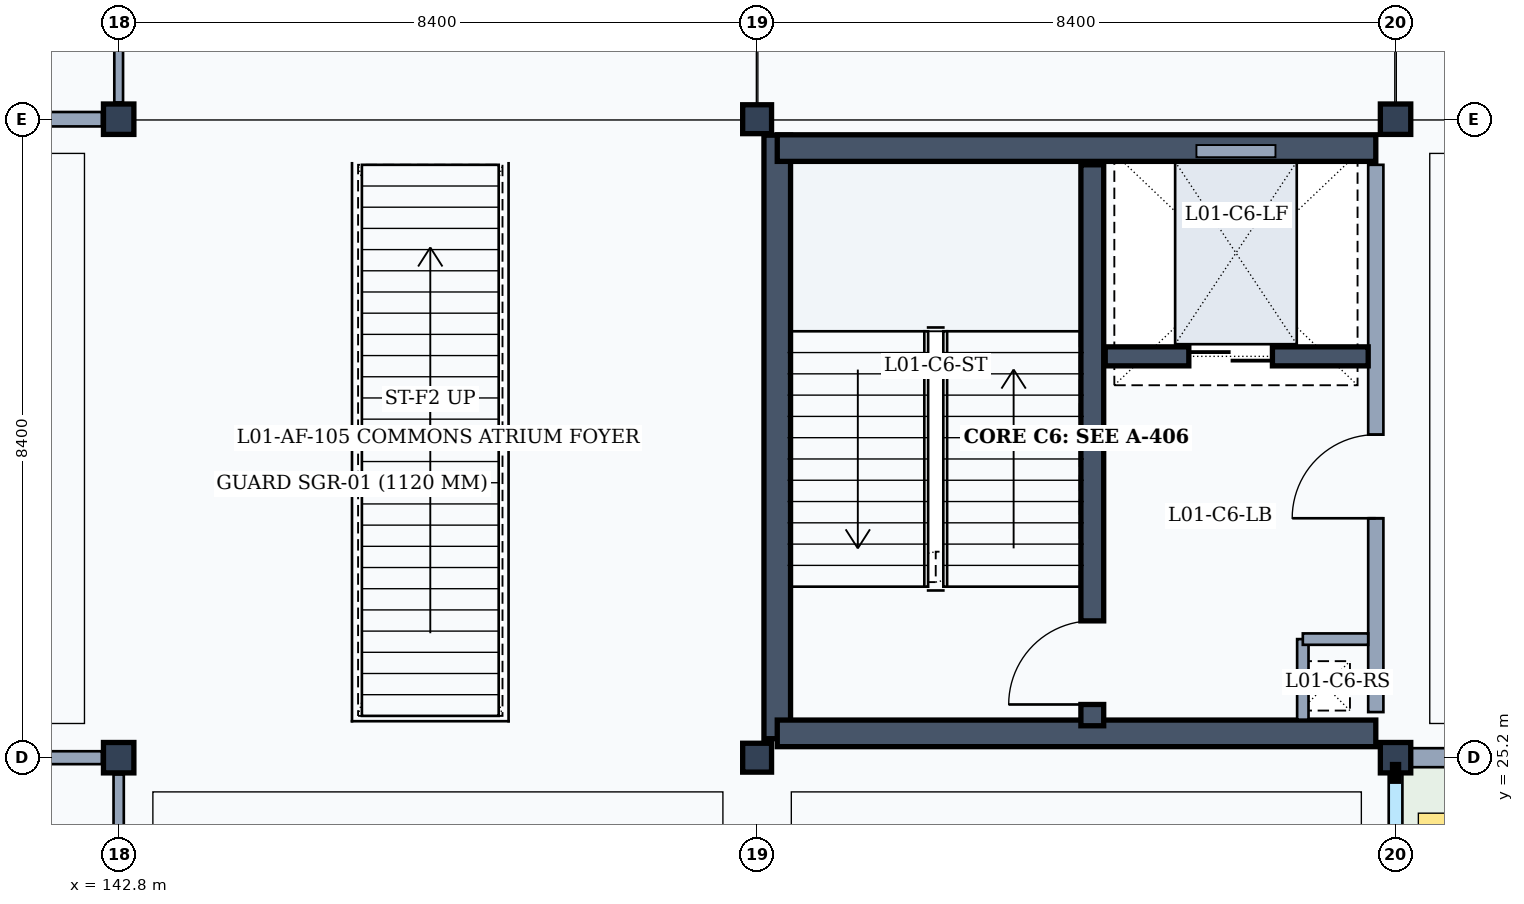
"""IFC4 building model, lengths in metres.
Left out: names, types, materials, properties, quantities, classifications, styles, units other than length and angle.
Written with IfcOpenShell. Run it as: python <this file> out.ifc"""

import sys

from ifc_helpers import new_model, si_unit, direction, frame, frame_2d, origin, origin_2d, place, context, subcontext, project, spatial, rectangle, extrude, element, fill, save


model = new_model("IFC4")
c1 = context("Model", 3, precision=1e-05, world=origin(), true_north=direction((0.0, 1.0)))
c2 = subcontext(c1, "Body", "Model", "MODEL_VIEW")
j1 = project(units=[si_unit("LENGTHUNIT", "METRE"), si_unit("PLANEANGLEUNIT", "RADIAN")], contexts=[c1])
p1 = place(None, origin())
s1 = spatial("IfcSite", under=j1, at=p1, CompositionType="ELEMENT")
p2 = place(p1, origin())
s2 = spatial("IfcBuilding", under=s1, at=p2, CompositionType="ELEMENT")
p3 = place(p2, frame((0.0, 0.0, 4.8)))
s3 = spatial("IfcBuildingStorey", under=s2, at=p3, CompositionType="ELEMENT", Elevation=4.8)
for number, where, z_axis, x_axis in (
    (1, (142.8, 25.2, 0.0), (0.0, 0.0, 1.0), (1.0, 0.0, 0.0)),
    (2, (142.8, 33.6, 0.0), (0.0, 0.0, 1.0), (1.0, 0.0, 0.0)),
):
    element("IfcColumn", number, at=place(p3, frame(where, z_axis=z_axis, x_axis=x_axis)), inside=s3, PredefinedType="COLUMN", context=c2, shape_type="SweptSolid", body=[
        extrude(rectangle(XDim=0.4, YDim=0.4, at=origin_2d()), origin(), (0.0, 0.0, 1.0), 4.8),
    ])
for number, where, z_axis, x_axis in (
    (3, (151.2, 25.2, 0.0), (0.0, 0.0, 1.0), (1.0, 0.0, 0.0)),
    (4, (151.2, 33.6, 0.0), (0.0, 0.0, 1.0), (1.0, 0.0, 0.0)),
):
    element("IfcColumn", number, at=place(p3, frame(where, z_axis=z_axis, x_axis=x_axis)), inside=s3, PredefinedType="COLUMN", context=c2, shape_type="SweptSolid", body=[
        extrude(rectangle(XDim=0.38, YDim=0.38, at=origin_2d()), origin(), (0.0, 0.0, 1.0), 4.8),
    ])
for number, where, z_axis, x_axis in (
    (5, (159.6, 25.2, 0.0), (0.0, 0.0, 1.0), (1.0, 0.0, 0.0)),
    (6, (159.6, 33.6, 0.0), (0.0, 0.0, 1.0), (1.0, 0.0, 0.0)),
):
    element("IfcColumn", number, at=place(p3, frame(where, z_axis=z_axis, x_axis=x_axis)), inside=s3, PredefinedType="COLUMN", context=c2, shape_type="SweptSolid", body=[
        extrude(rectangle(XDim=0.4, YDim=0.4, at=origin_2d()), origin(), (0.0, 0.0, 1.0), 4.8),
    ])
p4 = place(p3, frame((167.81, 25.2, 0.0), z_axis=(0.0, 0.0, 1.0), x_axis=(-1.0, 0.0, 0.0)))
e7 = element("IfcWall", 7, at=p4, inside=s3, PredefinedType="SOLIDWALL", context=c2, shape_type="SweptSolid", body=[
    extrude(rectangle(XDim=8.01, YDim=0.25, at=frame_2d((4.005, 0.0))), origin(), (0.0, 0.0, 1.0), 3.95),
])
p5 = place(p4, frame((3.005, 0.0, 0.9)))
e8 = element("IfcOpeningElement", 8, at=p5, cuts=e7, PredefinedType="OPENING", context=c2, shape_type="SweptSolid", body=[
    extrude(rectangle(XDim=2.0, YDim=1.7, at=frame_2d((1.0, 0.85))), frame((0.0, 0.135, 0.0), z_axis=(0.0, -1.0, 0.0), x_axis=(1.0, 0.0, 0.0)), (0.0, 0.0, 1.0), 0.27),
])
p6 = place(p3, frame((151.465, 25.45, 0.0), z_axis=(0.0, 0.0, 1.0), x_axis=(0.0, 1.0, 0.0)))
e9 = element("IfcWall", 9, at=p6, inside=s3, PredefinedType="SHEAR", context=c2, shape_type="SweptSolid", body=[
    extrude(rectangle(XDim=7.94, YDim=0.35, at=frame_2d((3.97, 0.0))), origin(), (0.0, 0.0, 1.0), 4.55),
])
p7 = place(p3, frame((151.465, 33.22, 0.0), z_axis=(0.0, 0.0, 1.0), x_axis=(1.0, 0.0, 0.0)))
e10 = element("IfcWall", 10, at=p7, inside=s3, PredefinedType="SHEAR", context=c2, shape_type="SweptSolid", body=[
    extrude(rectangle(XDim=7.875, YDim=0.35, at=frame_2d((3.938, 0.0))), origin(), (0.0, 0.0, 1.0), 4.55),
])
p8 = place(p3, frame((159.34, 33.0, 0.0), z_axis=(0.0, 0.0, 1.0), x_axis=(0.0, -1.0, 0.0)))
e11 = element("IfcWall", 11, at=p8, inside=s3, PredefinedType="PARTITIONING", context=c2, shape_type="SweptSolid", body=[
    extrude(rectangle(XDim=7.2, YDim=0.2, at=frame_2d((3.6, 0.0))), origin(), (0.0, 0.0, 1.0), 3.92),
])
p9 = place(p8, frame((3.55, 0.0, 0.0)))
e12 = element("IfcOpeningElement", 12, at=p9, cuts=e11, PredefinedType="OPENING", context=c2, shape_type="SweptSolid", body=[
    extrude(rectangle(XDim=1.1, YDim=2.15, at=frame_2d((0.55, 1.075))), frame((0.0, 0.11, 0.0), z_axis=(0.0, -1.0, 0.0), x_axis=(1.0, 0.0, 0.0)), (0.0, 0.0, 1.0), 0.22),
])
p10 = place(p3, frame((159.34, 25.52, 0.0), z_axis=(0.0, 0.0, 1.0), x_axis=(-1.0, 0.0, 0.0)))
e13 = element("IfcWall", 13, at=p10, inside=s3, PredefinedType="SHEAR", context=c2, shape_type="SweptSolid", body=[
    extrude(rectangle(XDim=7.875, YDim=0.35, at=frame_2d((3.938, 0.0))), origin(), (0.0, 0.0, 1.0), 4.55),
])
p11 = place(p3, frame((155.61, 25.62, 0.0), z_axis=(0.0, 0.0, 1.0), x_axis=(0.0, 1.0, 0.0)))
e14 = element("IfcWall", 14, at=p11, inside=s3, PredefinedType="SHEAR", context=c2, shape_type="SweptSolid", body=[
    extrude(rectangle(XDim=7.38, YDim=0.3, at=frame_2d((3.69, 0.0))), origin(), (0.0, 0.0, 1.0), 4.55),
])
p12 = place(p11, frame((0.28, 0.0, 0.0)))
e15 = element("IfcOpeningElement", 15, at=p12, cuts=e14, PredefinedType="OPENING", context=c2, shape_type="SweptSolid", body=[
    extrude(rectangle(XDim=1.1, YDim=2.15, at=frame_2d((0.55, 1.075))), frame((0.0, 0.16, 0.0), z_axis=(0.0, -1.0, 0.0), x_axis=(1.0, 0.0, 0.0)), (0.0, 0.0, 1.0), 0.32),
])
p13 = place(p3, frame((158.38, 26.76, 0.0), z_axis=(0.0, 0.0, 1.0), x_axis=(0.0, -1.0, 0.0)))
e16 = element("IfcWall", 16, at=p13, inside=s3, PredefinedType="PARTITIONING", context=c2, shape_type="SweptSolid", body=[
    extrude(rectangle(XDim=1.06, YDim=0.15, at=frame_2d((0.53, 0.0))), origin(), (0.0, 0.0, 1.0), 3.92),
])
p14 = place(p3, frame((158.38, 26.76, 0.0), z_axis=(0.0, 0.0, 1.0), x_axis=(1.0, 0.0, 0.0)))
e17 = element("IfcWall", 17, at=p14, inside=s3, PredefinedType="PARTITIONING", context=c2, shape_type="SweptSolid", body=[
    extrude(rectangle(XDim=0.86, YDim=0.15, at=frame_2d((0.43, 0.0))), origin(), (0.0, 0.0, 1.0), 3.92),
])
p15 = place(p3, frame((155.78, 30.48, 0.0), z_axis=(0.0, 0.0, 1.0), x_axis=(1.0, 0.0, 0.0)))
e18 = element("IfcWall", 18, at=p15, inside=s3, PredefinedType="SHEAR", context=c2, shape_type="SweptSolid", body=[
    extrude(rectangle(XDim=3.46, YDim=0.25, at=frame_2d((1.73, 0.0))), origin(), (0.0, 0.0, 1.0), 4.55),
])
p16 = place(p15, frame((1.1, 0.0, 0.0)))
e19 = element("IfcOpeningElement", 19, at=p16, cuts=e18, PredefinedType="OPENING", context=c2, shape_type="SweptSolid", body=[
    extrude(rectangle(XDim=1.1, YDim=2.15, at=frame_2d((0.55, 1.075))), frame((0.0, 0.135, 0.0), z_axis=(0.0, -1.0, 0.0), x_axis=(1.0, 0.0, 0.0)), (0.0, 0.0, 1.0), 0.27),
])
p17 = place(p3, frame((142.8, 17.02, 0.0), z_axis=(0.0, 0.0, 1.0), x_axis=(0.0, 1.0, 0.0)))
e20 = element("IfcWall", 20, at=p17, inside=s3, PredefinedType="PARTITIONING", context=c2, shape_type="SweptSolid", body=[
    extrude(rectangle(XDim=7.96, YDim=0.135, at=frame_2d((3.98, 0.0))), origin(), (0.0, 0.0, 1.0), 3.92),
])
p18 = place(p3, frame((134.61, 25.2, 0.0), z_axis=(0.0, 0.0, 1.0), x_axis=(1.0, 0.0, 0.0)))
e21 = element("IfcWall", 21, at=p18, inside=s3, PredefinedType="PARTITIONING", context=c2, shape_type="SweptSolid", body=[
    extrude(rectangle(XDim=7.97, YDim=0.17, at=frame_2d((3.985, 0.0))), origin(), (0.0, 0.0, 1.0), 3.89),
])
p19 = place(p18, frame((2.975, 0.0, 0.0)))
e22 = element("IfcOpeningElement", 22, at=p19, cuts=e21, PredefinedType="OPENING", context=c2, shape_type="SweptSolid", body=[
    extrude(rectangle(XDim=1.55, YDim=2.35, at=frame_2d((0.775, 1.175))), frame((0.0, 0.095, 0.0), z_axis=(0.0, -1.0, 0.0), x_axis=(1.0, 0.0, 0.0)), (0.0, 0.0, 1.0), 0.19),
])
p20 = place(p3, frame((134.61, 33.6, 0.0), z_axis=(0.0, 0.0, 1.0), x_axis=(1.0, 0.0, 0.0)))
e23 = element("IfcWall", 23, at=p20, inside=s3, PredefinedType="PARTITIONING", context=c2, shape_type="SweptSolid", body=[
    extrude(rectangle(XDim=7.97, YDim=0.19, at=frame_2d((3.985, 0.0))), origin(), (0.0, 0.0, 1.0), 3.89),
])
p21 = place(p20, frame((2.9, 0.0, 0.0)))
e24 = element("IfcOpeningElement", 24, at=p21, cuts=e23, PredefinedType="OPENING", context=c2, shape_type="SweptSolid", body=[
    extrude(rectangle(XDim=1.7, YDim=2.3, at=frame_2d((0.85, 1.15))), frame((0.0, 0.105, 0.0), z_axis=(0.0, -1.0, 0.0), x_axis=(1.0, 0.0, 0.0)), (0.0, 0.0, 1.0), 0.21),
])
p22 = place(p3, frame((142.8, 33.82, 0.0), z_axis=(0.0, 0.0, 1.0), x_axis=(0.0, 1.0, 0.0)))
e25 = element("IfcWall", 25, at=p22, inside=s3, PredefinedType="PARTITIONING", context=c2, shape_type="SweptSolid", body=[
    extrude(rectangle(XDim=7.96, YDim=0.115, at=frame_2d((3.98, 0.0))), origin(), (0.0, 0.0, 1.0), 3.92),
])
p23 = place(p9, frame((1.1, 0.0, 0.0), z_axis=(0.0, 0.0, 1.0), x_axis=(-1.0, 0.0, 0.0)))
e26 = element("IfcDoor", 26, at=p23, inside=s3, OperationType="SINGLE_SWING_LEFT", PredefinedType="DOOR", context=c2, shape_type="SweptSolid", body=[
    extrude(rectangle(XDim=1.1, YDim=2.15, at=frame_2d((0.55, 1.075))), frame((0.0, 0.025, 0.0), z_axis=(0.0, -1.0, 0.0), x_axis=(1.0, 0.0, 0.0)), (0.0, 0.0, 1.0), 0.05),
])
fill(e12, e26)
p24 = place(p12, origin())
e27 = element("IfcDoor", 27, at=p24, inside=s3, OperationType="SINGLE_SWING_LEFT", PredefinedType="DOOR", context=c2, shape_type="SweptSolid", body=[
    extrude(rectangle(XDim=1.1, YDim=2.15, at=frame_2d((0.55, 1.075))), frame((0.0, 0.025, 0.0), z_axis=(0.0, -1.0, 0.0), x_axis=(1.0, 0.0, 0.0)), (0.0, 0.0, 1.0), 0.05),
])
fill(e15, e27)
p25 = place(p16, origin())
e28 = element("IfcDoor", 28, at=p25, inside=s3, OperationType="DOUBLE_DOOR_SLIDING", PredefinedType="DOOR", context=c2, shape_type="SweptSolid", body=[
    extrude(rectangle(XDim=1.1, YDim=2.15, at=frame_2d((0.55, 1.075))), frame((0.0, 0.025, 0.0), z_axis=(0.0, -1.0, 0.0), x_axis=(1.0, 0.0, 0.0)), (0.0, 0.0, 1.0), 0.05),
])
fill(e19, e28)
save(model, sys.argv[1])
